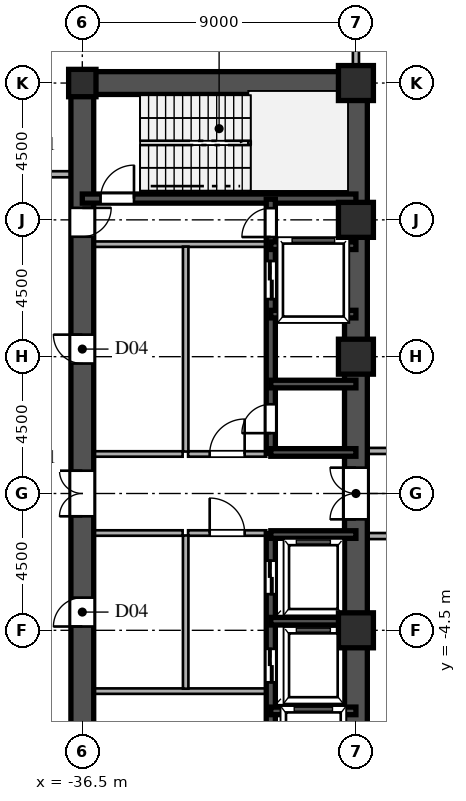
"""IFC4 building model, lengths in metres.
Left out: names, types, materials, properties, quantities, classifications, styles, units other than length and angle.
Written with IfcOpenShell. Run it as: python <this file> out.ifc"""

import sys

from ifc_helpers import new_model, si_unit, direction, frame, frame_2d, origin, origin_2d, place, context, subcontext, project, spatial, rectangle, hollow_rectangle, i_section, extrude, source, transform, mapped, element, fill, save


model = new_model("IFC4")
c1 = context("Model", 3, precision=1e-05, world=origin(), true_north=direction((0.0, 1.0)))
c2 = subcontext(c1, "Body", "Model", "MODEL_VIEW")
j1 = project(units=[si_unit("LENGTHUNIT", "METRE"), si_unit("PLANEANGLEUNIT", "RADIAN")], contexts=[c1])
p1 = place(None, origin())
s1 = spatial("IfcSite", under=j1, at=p1, CompositionType="ELEMENT")
p2 = place(p1, origin())
s2 = spatial("IfcBuilding", under=s1, at=p2, CompositionType="ELEMENT")
p3 = place(p2, frame((0.0, 0.0, -4.8)))
s3 = spatial("IfcBuildingStorey", under=s2, at=p3, CompositionType="ELEMENT", Elevation=-4.8)
m1 = source(origin(), c2, "Body", "SweptSolid", [
    extrude(hollow_rectangle(XDim=1.15, YDim=1.15, WallThickness=0.048, at=origin_2d()), origin(), (0.0, 0.0, 1.0), 4.8),
])
for number, where, z_axis, x_axis in (
    (1, (-27.5, -4.5, 0.0), (0.0, 0.0, 1.0), (1.0, 0.0, 0.0)),
    (2, (-27.5, 4.5, 0.0), (0.0, 0.0, 1.0), (1.0, 0.0, 0.0)),
    (3, (-27.5, 9.0, 0.0), (0.0, 0.0, 1.0), (1.0, 0.0, 0.0)),
    (4, (-27.5, 13.5, 0.0), (0.0, 0.0, 1.0), (1.0, 0.0, 0.0)),
):
    element("IfcColumn", number, at=place(p3, frame(where, z_axis=z_axis, x_axis=x_axis)), inside=s3, PredefinedType="COLUMN", context=c2, shape_type="MappedRepresentation", body=[
        mapped(m1, transform((0.0, 0.0, 0.0), scale=1.0)),
    ])
m2 = source(origin(), c2, "Body", "SweptSolid", [
    extrude(i_section(OverallWidth=0.9, OverallDepth=0.9, WebThickness=0.036, FlangeThickness=0.055, at=origin_2d()), origin(), (0.0, 0.0, 1.0), 4.8),
])
p4 = place(p3, frame((-36.5, 13.5, 0.0), z_axis=(0.0, 0.0, 1.0), x_axis=(1.0, 0.0, 0.0)))
e5 = element("IfcColumn", 5, at=p4, inside=s3, PredefinedType="COLUMN", context=c2, shape_type="MappedRepresentation", body=[
    mapped(m2, transform((0.0, 0.0, 0.0), scale=1.0)),
])
for number, where, z_axis, x_axis in (
    (6, (-27.5, -13.5, 0.0), (0.0, 0.0, 1.0), (0.0, 1.0, 0.0)),
    (7, (-27.5, 1.3, 0.0), (0.0, 0.0, 1.0), (0.0, 1.0, 0.0)),
):
    element("IfcWall", number, at=place(p3, frame(where, z_axis=z_axis, x_axis=x_axis)), inside=s3, PredefinedType="SHEAR", context=c2, shape_type="SweptSolid", body=[
        extrude(rectangle(XDim=12.2, YDim=0.75, at=frame_2d((6.1, 0.0))), origin(), (0.0, 0.0, 1.0), 4.52),
    ])
p5 = place(p3, frame((-27.5, -1.3, 0.0), z_axis=(0.0, 0.0, 1.0), x_axis=(0.0, 1.0, 0.0)))
e8 = element("IfcWall", 8, at=p5, inside=s3, PredefinedType="SHEAR", context=c2, shape_type="SweptSolid", body=[
    extrude(rectangle(XDim=2.6, YDim=0.75, at=frame_2d((1.3, 0.0))), origin(), (0.0, 0.0, 1.0), 4.52),
])
p6 = place(p5, frame((0.45, 0.0, 0.0)))
e9 = element("IfcOpeningElement", 9, at=p6, cuts=e8, PredefinedType="OPENING", context=c2, shape_type="SweptSolid", body=[
    extrude(rectangle(XDim=1.7, YDim=2.35, at=frame_2d((0.85, 1.175))), frame((0.0, 0.385, 0.0), z_axis=(0.0, -1.0, 0.0), x_axis=(1.0, 0.0, 0.0)), (0.0, 0.0, 1.0), 0.77),
])
p7 = place(p3, frame((-36.5, 13.5, 0.0), z_axis=(0.0, 0.0, 1.0), x_axis=(1.0, 0.0, 0.0)))
e10 = element("IfcWall", 10, at=p7, inside=s3, PredefinedType="SHEAR", context=c2, shape_type="SweptSolid", body=[
    extrude(rectangle(XDim=9.0, YDim=0.75, at=frame_2d((4.5, 0.0))), origin(), (0.0, 0.0, 1.0), 4.52),
])
p8 = place(p3, frame((-36.5, -13.65, 0.0), z_axis=(0.0, 0.0, 1.0), x_axis=(0.0, 1.0, 0.0)))
e11 = element("IfcWall", 11, at=p8, inside=s3, PredefinedType="SHEAR", context=c2, shape_type="SweptSolid", body=[
    extrude(rectangle(XDim=7.15, YDim=0.75, at=frame_2d((3.575, 0.0))), origin(), (0.0, 0.0, 1.0), 4.52),
])
p9 = place(p8, frame((4.675, 0.0, 0.0)))
e12 = element("IfcOpeningElement", 12, at=p9, cuts=e11, PredefinedType="OPENING", context=c2, shape_type="SweptSolid", body=[
    extrude(rectangle(XDim=1.15, YDim=2.2, at=frame_2d((0.575, 1.1))), frame((0.0, 0.385, 0.0), z_axis=(0.0, -1.0, 0.0), x_axis=(1.0, 0.0, 0.0)), (0.0, 0.0, 1.0), 0.77),
])
p10 = place(p3, frame((-36.5, -1.3, 0.0), z_axis=(0.0, 0.0, 1.0), x_axis=(0.0, 1.0, 0.0)))
e13 = element("IfcWall", 13, at=p10, inside=s3, PredefinedType="SHEAR", context=c2, shape_type="SweptSolid", body=[
    extrude(rectangle(XDim=2.6, YDim=0.75, at=frame_2d((1.3, 0.0))), origin(), (0.0, 0.0, 1.0), 4.52),
])
p11 = place(p10, frame((0.55, 0.0, 0.0)))
e14 = element("IfcOpeningElement", 14, at=p11, cuts=e13, PredefinedType="OPENING", context=c2, shape_type="SweptSolid", body=[
    extrude(rectangle(XDim=1.5, YDim=2.3, at=frame_2d((0.75, 1.15))), frame((0.0, 0.385, 0.0), z_axis=(0.0, -1.0, 0.0), x_axis=(1.0, 0.0, 0.0)), (0.0, 0.0, 1.0), 0.77),
])
p12 = place(p3, frame((-36.5, 8.2, 0.0), z_axis=(0.0, 0.0, 1.0), x_axis=(0.0, 1.0, 0.0)))
e15 = element("IfcWall", 15, at=p12, inside=s3, PredefinedType="SHEAR", context=c2, shape_type="SweptSolid", body=[
    extrude(rectangle(XDim=5.45, YDim=0.75, at=frame_2d((2.725, 0.0))), origin(), (0.0, 0.0, 1.0), 4.52),
])
p13 = place(p12, frame((0.245, 0.0, 0.0)))
e16 = element("IfcOpeningElement", 16, at=p13, cuts=e15, PredefinedType="OPENING", context=c2, shape_type="SweptSolid", body=[
    extrude(rectangle(XDim=0.95, YDim=2.15, at=frame_2d((0.475, 1.075))), frame((0.0, 0.385, 0.0), z_axis=(0.0, -1.0, 0.0), x_axis=(1.0, 0.0, 0.0)), (0.0, 0.0, 1.0), 0.77),
])
p14 = place(p3, frame((-36.5, -6.5, 0.0), z_axis=(0.0, 0.0, 1.0), x_axis=(0.0, 1.0, 0.0)))
e17 = element("IfcWall", 17, at=p14, inside=s3, PredefinedType="SHEAR", context=c2, shape_type="SweptSolid", body=[
    extrude(rectangle(XDim=5.2, YDim=0.75, at=frame_2d((2.6, 0.0))), origin(), (0.0, 0.0, 1.0), 4.52),
])
p15 = place(p14, frame((2.125, 0.0, 0.0)))
e18 = element("IfcOpeningElement", 18, at=p15, cuts=e17, PredefinedType="OPENING", context=c2, shape_type="SweptSolid", body=[
    extrude(rectangle(XDim=0.95, YDim=2.15, at=frame_2d((0.475, 1.075))), frame((0.0, 0.385, 0.0), z_axis=(0.0, -1.0, 0.0), x_axis=(1.0, 0.0, 0.0)), (0.0, 0.0, 1.0), 0.77),
])
p16 = place(p3, frame((-36.5, 1.3, 0.0), z_axis=(0.0, 0.0, 1.0), x_axis=(0.0, 1.0, 0.0)))
e19 = element("IfcWall", 19, at=p16, inside=s3, PredefinedType="SHEAR", context=c2, shape_type="SweptSolid", body=[
    extrude(rectangle(XDim=6.9, YDim=0.75, at=frame_2d((3.45, 0.0))), origin(), (0.0, 0.0, 1.0), 4.52),
])
p17 = place(p16, frame((2.975, 0.0, 0.0)))
e20 = element("IfcOpeningElement", 20, at=p17, cuts=e19, PredefinedType="OPENING", context=c2, shape_type="SweptSolid", body=[
    extrude(rectangle(XDim=0.95, YDim=2.15, at=frame_2d((0.475, 1.075))), frame((0.0, 0.385, 0.0), z_axis=(0.0, -1.0, 0.0), x_axis=(1.0, 0.0, 0.0)), (0.0, 0.0, 1.0), 0.77),
])
p18 = place(p3, frame((-36.5, 9.7, 0.0), z_axis=(0.0, 0.0, 1.0), x_axis=(1.0, 0.0, 0.0)))
e21 = element("IfcWall", 21, at=p18, inside=s3, PredefinedType="SHEAR", context=c2, shape_type="SweptSolid", body=[
    extrude(rectangle(XDim=9.0, YDim=0.3, at=frame_2d((4.5, 0.0))), origin(), (0.0, 0.0, 1.0), 4.52),
])
p19 = place(p18, frame((0.6, 0.0, 0.0)))
e22 = element("IfcOpeningElement", 22, at=p19, cuts=e21, PredefinedType="OPENING", context=c2, shape_type="SweptSolid", body=[
    extrude(rectangle(XDim=1.1, YDim=2.2, at=frame_2d((0.55, 1.1))), frame((0.0, 0.16, 0.0), z_axis=(0.0, -1.0, 0.0), x_axis=(1.0, 0.0, 0.0)), (0.0, 0.0, 1.0), 0.32),
])
for number, where, z_axis, x_axis in (
    (23, (-30.3, -7.15, 0.0), (0.0, 0.0, 1.0), (1.0, 0.0, 0.0)),
    (24, (-30.3, -4.2, 0.0), (0.0, 0.0, 1.0), (1.0, 0.0, 0.0)),
    (25, (-30.3, -1.35, 0.0), (0.0, 0.0, 1.0), (1.0, 0.0, 0.0)),
    (26, (-30.3, 1.35, 0.0), (0.0, 0.0, 1.0), (1.0, 0.0, 0.0)),
    (27, (-30.3, 3.6, 0.0), (0.0, 0.0, 1.0), (1.0, 0.0, 0.0)),
    (28, (-30.3, 5.9, 0.0), (0.0, 0.0, 1.0), (1.0, 0.0, 0.0)),
    (29, (-30.3, 8.15, 0.0), (0.0, 0.0, 1.0), (1.0, 0.0, 0.0)),
):
    element("IfcWall", number, at=place(p3, frame(where, z_axis=z_axis, x_axis=x_axis)), inside=s3, PredefinedType="SHEAR", context=c2, shape_type="SweptSolid", body=[
        extrude(rectangle(XDim=2.8, YDim=0.25, at=frame_2d((1.4, 0.0))), origin(), (0.0, 0.0, 1.0), 4.52),
    ])
p20 = place(p3, frame((-30.3, -9.68, 0.0), z_axis=(0.0, 0.0, 1.0), x_axis=(0.0, 1.0, 0.0)))
e30 = element("IfcWall", 30, at=p20, inside=s3, PredefinedType="SHEAR", context=c2, shape_type="SweptSolid", body=[
    extrude(rectangle(XDim=2.56, YDim=0.3, at=frame_2d((1.28, 0.0))), origin(), (0.0, 0.0, 1.0), 4.52),
])
p21 = place(p20, frame((0.68, 0.0, 0.0)))
e31 = element("IfcOpeningElement", 31, at=p21, cuts=e30, PredefinedType="OPENING", context=c2, shape_type="SweptSolid", body=[
    extrude(rectangle(XDim=1.2, YDim=2.25, at=frame_2d((0.6, 1.125))), frame((0.0, 0.16, 0.0), z_axis=(0.0, -1.0, 0.0), x_axis=(1.0, 0.0, 0.0)), (0.0, 0.0, 1.0), 0.32),
])
p22 = place(p3, frame((-30.3, -7.12, 0.0), z_axis=(0.0, 0.0, 1.0), x_axis=(0.0, 1.0, 0.0)))
e32 = element("IfcWall", 32, at=p22, inside=s3, PredefinedType="SHEAR", context=c2, shape_type="SweptSolid", body=[
    extrude(rectangle(XDim=2.92, YDim=0.3, at=frame_2d((1.46, 0.0))), origin(), (0.0, 0.0, 1.0), 4.52),
])
p23 = place(p22, frame((0.91, 0.0, 0.0)))
e33 = element("IfcOpeningElement", 33, at=p23, cuts=e32, PredefinedType="OPENING", context=c2, shape_type="SweptSolid", body=[
    extrude(rectangle(XDim=1.1, YDim=2.2, at=frame_2d((0.55, 1.1))), frame((0.0, 0.16, 0.0), z_axis=(0.0, -1.0, 0.0), x_axis=(1.0, 0.0, 0.0)), (0.0, 0.0, 1.0), 0.32),
])
p24 = place(p3, frame((-30.3, -4.2, 0.0), z_axis=(0.0, 0.0, 1.0), x_axis=(0.0, 1.0, 0.0)))
e34 = element("IfcWall", 34, at=p24, inside=s3, PredefinedType="SHEAR", context=c2, shape_type="SweptSolid", body=[
    extrude(rectangle(XDim=2.88, YDim=0.3, at=frame_2d((1.44, 0.0))), origin(), (0.0, 0.0, 1.0), 4.52),
])
p25 = place(p24, frame((0.89, 0.0, 0.0)))
e35 = element("IfcOpeningElement", 35, at=p25, cuts=e34, PredefinedType="OPENING", context=c2, shape_type="SweptSolid", body=[
    extrude(rectangle(XDim=1.1, YDim=2.2, at=frame_2d((0.55, 1.1))), frame((0.0, 0.16, 0.0), z_axis=(0.0, -1.0, 0.0), x_axis=(1.0, 0.0, 0.0)), (0.0, 0.0, 1.0), 0.32),
])
p26 = place(p3, frame((-30.3, 1.32, 0.0), z_axis=(0.0, 0.0, 1.0), x_axis=(0.0, 1.0, 0.0)))
e36 = element("IfcWall", 36, at=p26, inside=s3, PredefinedType="SHEAR", context=c2, shape_type="SweptSolid", body=[
    extrude(rectangle(XDim=2.28, YDim=0.3, at=frame_2d((1.14, 0.0))), origin(), (0.0, 0.0, 1.0), 4.52),
])
p27 = place(p26, frame((0.665, 0.0, 0.0)))
e37 = element("IfcOpeningElement", 37, at=p27, cuts=e36, PredefinedType="OPENING", context=c2, shape_type="SweptSolid", body=[
    extrude(rectangle(XDim=0.95, YDim=2.15, at=frame_2d((0.475, 1.075))), frame((0.0, 0.16, 0.0), z_axis=(0.0, -1.0, 0.0), x_axis=(1.0, 0.0, 0.0)), (0.0, 0.0, 1.0), 0.32),
])
p28 = place(p3, frame((-30.3, 3.6, 0.0), z_axis=(0.0, 0.0, 1.0), x_axis=(0.0, 1.0, 0.0)))
e38 = element("IfcWall", 38, at=p28, inside=s3, PredefinedType="SHEAR", context=c2, shape_type="SweptSolid", body=[
    extrude(rectangle(XDim=2.3, YDim=0.3, at=frame_2d((1.15, 0.0))), origin(), (0.0, 0.0, 1.0), 4.52),
])
p29 = place(p3, frame((-30.3, 5.9, 0.0), z_axis=(0.0, 0.0, 1.0), x_axis=(0.0, 1.0, 0.0)))
e39 = element("IfcWall", 39, at=p29, inside=s3, PredefinedType="SHEAR", context=c2, shape_type="SweptSolid", body=[
    extrude(rectangle(XDim=2.25, YDim=0.3, at=frame_2d((1.125, 0.0))), origin(), (0.0, 0.0, 1.0), 4.52),
])
p30 = place(p29, frame((0.495, 0.0, 0.0)))
e40 = element("IfcOpeningElement", 40, at=p30, cuts=e39, PredefinedType="OPENING", context=c2, shape_type="SweptSolid", body=[
    extrude(rectangle(XDim=1.25, YDim=2.3, at=frame_2d((0.625, 1.15))), frame((0.0, 0.16, 0.0), z_axis=(0.0, -1.0, 0.0), x_axis=(1.0, 0.0, 0.0)), (0.0, 0.0, 1.0), 0.32),
])
p31 = place(p3, frame((-30.3, 8.15, 0.0), z_axis=(0.0, 0.0, 1.0), x_axis=(0.0, 1.0, 0.0)))
e41 = element("IfcWall", 41, at=p31, inside=s3, PredefinedType="SHEAR", context=c2, shape_type="SweptSolid", body=[
    extrude(rectangle(XDim=1.53, YDim=0.3, at=frame_2d((0.765, 0.0))), origin(), (0.0, 0.0, 1.0), 4.52),
])
p32 = place(p31, frame((0.285, 0.0, 0.0)))
e42 = element("IfcOpeningElement", 42, at=p32, cuts=e41, PredefinedType="OPENING", context=c2, shape_type="SweptSolid", body=[
    extrude(rectangle(XDim=0.95, YDim=2.15, at=frame_2d((0.475, 1.075))), frame((0.0, 0.16, 0.0), z_axis=(0.0, -1.0, 0.0), x_axis=(1.0, 0.0, 0.0)), (0.0, 0.0, 1.0), 0.32),
])
for number, where, z_axis, x_axis in (
    (43, (-36.15, -6.5, 0.0), (0.0, 0.0, 1.0), (1.0, 0.0, 0.0)),
    (44, (-36.15, 8.2, 0.0), (0.0, 0.0, 1.0), (1.0, 0.0, 0.0)),
):
    element("IfcWall", number, at=place(p3, frame(where, z_axis=z_axis, x_axis=x_axis)), inside=s3, PredefinedType="PARTITIONING", context=c2, shape_type="SweptSolid", body=[
        extrude(rectangle(XDim=5.7, YDim=0.18, at=frame_2d((2.85, 0.0))), origin(), (0.0, 0.0, 1.0), 4.52),
    ])
p33 = place(p3, frame((-33.1, -6.42, 0.0), z_axis=(0.0, 0.0, 1.0), x_axis=(0.0, 1.0, 0.0)))
e45 = element("IfcWall", 45, at=p33, inside=s3, PredefinedType="PARTITIONING", context=c2, shape_type="SweptSolid", body=[
    extrude(rectangle(XDim=5.04, YDim=0.18, at=frame_2d((2.52, 0.0))), origin(), (0.0, 0.0, 1.0), 4.52),
])
p34 = place(p3, frame((-33.1, 1.38, 0.0), z_axis=(0.0, 0.0, 1.0), x_axis=(0.0, 1.0, 0.0)))
e46 = element("IfcWall", 46, at=p34, inside=s3, PredefinedType="PARTITIONING", context=c2, shape_type="SweptSolid", body=[
    extrude(rectangle(XDim=6.74, YDim=0.18, at=frame_2d((3.37, 0.0))), origin(), (0.0, 0.0, 1.0), 4.52),
])
p35 = place(p3, frame((-33.02, -1.3, 0.0), z_axis=(0.0, 0.0, 1.0), x_axis=(1.0, 0.0, 0.0)))
e47 = element("IfcWall", 47, at=p35, inside=s3, PredefinedType="PARTITIONING", context=c2, shape_type="SweptSolid", body=[
    extrude(rectangle(XDim=2.57, YDim=0.18, at=frame_2d((1.285, 0.0))), origin(), (0.0, 0.0, 1.0), 4.52),
])
p36 = place(p35, frame((0.71, 0.0, 0.0)))
e48 = element("IfcOpeningElement", 48, at=p36, cuts=e47, PredefinedType="OPENING", context=c2, shape_type="SweptSolid", body=[
    extrude(rectangle(XDim=1.15, YDim=2.2, at=frame_2d((0.575, 1.1))), frame((0.0, 0.1, 0.0), z_axis=(0.0, -1.0, 0.0), x_axis=(1.0, 0.0, 0.0)), (0.0, 0.0, 1.0), 0.2),
])
p37 = place(p3, frame((-33.02, 1.3, 0.0), z_axis=(0.0, 0.0, 1.0), x_axis=(1.0, 0.0, 0.0)))
e49 = element("IfcWall", 49, at=p37, inside=s3, PredefinedType="PARTITIONING", context=c2, shape_type="SweptSolid", body=[
    extrude(rectangle(XDim=2.57, YDim=0.18, at=frame_2d((1.285, 0.0))), origin(), (0.0, 0.0, 1.0), 4.52),
])
p38 = place(p37, frame((0.71, 0.0, 0.0)))
e50 = element("IfcOpeningElement", 50, at=p38, cuts=e49, PredefinedType="OPENING", context=c2, shape_type="SweptSolid", body=[
    extrude(rectangle(XDim=1.15, YDim=2.2, at=frame_2d((0.575, 1.1))), frame((0.0, 0.1, 0.0), z_axis=(0.0, -1.0, 0.0), x_axis=(1.0, 0.0, 0.0)), (0.0, 0.0, 1.0), 0.2),
])
for number, where, z_axis, x_axis in (
    (51, (-36.15, -1.3, 0.0), (0.0, 0.0, 1.0), (1.0, 0.0, 0.0)),
    (52, (-36.15, 1.3, 0.0), (0.0, 0.0, 1.0), (1.0, 0.0, 0.0)),
):
    element("IfcWall", number, at=place(p3, frame(where, z_axis=z_axis, x_axis=x_axis)), inside=s3, PredefinedType="PARTITIONING", context=c2, shape_type="SweptSolid", body=[
        extrude(rectangle(XDim=2.95, YDim=0.18, at=frame_2d((1.475, 0.0))), origin(), (0.0, 0.0, 1.0), 4.52),
    ])
p39 = place(p3, frame((-27.12, -1.4, 0.0), z_axis=(0.0, 0.0, 1.0), x_axis=(1.0, 0.0, 0.0)))
e53 = element("IfcWall", 53, at=p39, inside=s3, PredefinedType="PARTITIONING", context=c2, shape_type="SweptSolid", body=[
    extrude(rectangle(XDim=33.535, YDim=0.2, at=frame_2d((16.768, 0.0))), origin(), (0.0, 0.0, 1.0), 4.52),
])
p40 = place(p39, frame((16.045, 0.0, 0.0)))
e54 = element("IfcOpeningElement", 54, at=p40, cuts=e53, PredefinedType="OPENING", context=c2, shape_type="SweptSolid", body=[
    extrude(rectangle(XDim=1.15, YDim=2.2, at=frame_2d((0.575, 1.1))), frame((0.0, 0.11, 0.0), z_axis=(0.0, -1.0, 0.0), x_axis=(1.0, 0.0, 0.0)), (0.0, 0.0, 1.0), 0.22),
])
p41 = place(p3, frame((-27.12, 1.4, 0.0), z_axis=(0.0, 0.0, 1.0), x_axis=(1.0, 0.0, 0.0)))
e55 = element("IfcWall", 55, at=p41, inside=s3, PredefinedType="PARTITIONING", context=c2, shape_type="SweptSolid", body=[
    extrude(rectangle(XDim=54.24, YDim=0.2, at=frame_2d((27.12, 0.0))), origin(), (0.0, 0.0, 1.0), 4.52),
])
p42 = place(p41, frame((19.545, 0.0, 0.0)))
e56 = element("IfcOpeningElement", 56, at=p42, cuts=e55, PredefinedType="OPENING", context=c2, shape_type="SweptSolid", body=[
    extrude(rectangle(XDim=1.15, YDim=2.2, at=frame_2d((0.575, 1.1))), frame((0.0, 0.11, 0.0), z_axis=(0.0, -1.0, 0.0), x_axis=(1.0, 0.0, 0.0)), (0.0, 0.0, 1.0), 0.22),
])
p43 = place(p41, frame((46.93, 0.0, 0.0)))
e57 = element("IfcOpeningElement", 57, at=p43, cuts=e55, PredefinedType="OPENING", context=c2, shape_type="SweptSolid", body=[
    extrude(rectangle(XDim=0.88, YDim=2.1, at=frame_2d((0.44, 1.05))), frame((0.0, 0.11, 0.0), z_axis=(0.0, -1.0, 0.0), x_axis=(1.0, 0.0, 0.0)), (0.0, 0.0, 1.0), 0.22),
])
p44 = place(p3, frame((-38.915, 10.5, 0.0), z_axis=(0.0, 0.0, 1.0), x_axis=(1.0, 0.0, 0.0)))
e58 = element("IfcWall", 58, at=p44, inside=s3, PredefinedType="PARTITIONING", context=c2, shape_type="SweptSolid", body=[
    extrude(rectangle(XDim=2.035, YDim=0.2, at=frame_2d((1.018, 0.0))), origin(), (0.0, 0.0, 1.0), 4.52),
])
p45 = place(p3, frame((-27.5, 13.88, 0.0), z_axis=(0.0, 0.0, 1.0), x_axis=(0.0, 1.0, 0.0)))
e59 = element("IfcWall", 59, at=p45, inside=s3, PredefinedType="PARTITIONING", context=c2, shape_type="SweptSolid", body=[
    extrude(rectangle(XDim=7.933, YDim=0.2, at=frame_2d((3.966, 0.0))), origin(), (0.0, 0.0, 1.0), 3.932),
])
m3 = source(origin(), c2, "Body", "SweptSolid", [
    extrude(rectangle(XDim=1.7, YDim=2.35, at=frame_2d((0.85, 1.175))), frame((0.0, 0.025, 0.0), z_axis=(0.0, -1.0, 0.0), x_axis=(1.0, 0.0, 0.0)), (0.0, 0.0, 1.0), 0.05),
])
p46 = place(p6, origin())
e60 = element("IfcDoor", 60, at=p46, inside=s3, OperationType="DOUBLE_SWING_LEFT", PredefinedType="DOOR", context=c2, shape_type="MappedRepresentation", body=[
    mapped(m3, transform((0.0, 0.0, 0.0), scale=1.0)),
])
fill(e9, e60)
m4 = source(origin(), c2, "Body", "SweptSolid", [
    extrude(rectangle(XDim=1.5, YDim=2.3, at=frame_2d((0.75, 1.15))), frame((0.0, 0.025, 0.0), z_axis=(0.0, -1.0, 0.0), x_axis=(1.0, 0.0, 0.0)), (0.0, 0.0, 1.0), 0.05),
])
p47 = place(p11, origin())
e61 = element("IfcDoor", 61, at=p47, inside=s3, OperationType="DOUBLE_SWING_LEFT", PredefinedType="DOOR", context=c2, shape_type="MappedRepresentation", body=[
    mapped(m4, transform((0.0, 0.0, 0.0), scale=1.0)),
])
fill(e14, e61)
m5 = source(origin(), c2, "Body", "SweptSolid", [
    extrude(rectangle(XDim=0.95, YDim=2.15, at=frame_2d((0.475, 1.075))), frame((0.0, 0.025, 0.0), z_axis=(0.0, -1.0, 0.0), x_axis=(1.0, 0.0, 0.0)), (0.0, 0.0, 1.0), 0.05),
])
p48 = place(p13, frame((0.95, 0.0, 0.0), z_axis=(0.0, 0.0, 1.0), x_axis=(-1.0, 0.0, 0.0)))
e62 = element("IfcDoor", 62, at=p48, inside=s3, OperationType="SINGLE_SWING_RIGHT", PredefinedType="DOOR", context=c2, shape_type="MappedRepresentation", body=[
    mapped(m5, transform((0.0, 0.0, 0.0), scale=1.0)),
])
fill(e16, e62)
p49 = place(p15, origin())
e63 = element("IfcDoor", 63, at=p49, inside=s3, OperationType="SINGLE_SWING_LEFT", PredefinedType="DOOR", context=c2, shape_type="MappedRepresentation", body=[
    mapped(m5, transform((0.0, 0.0, 0.0), scale=1.0)),
])
fill(e18, e63)
p50 = place(p17, origin())
e64 = element("IfcDoor", 64, at=p50, inside=s3, OperationType="SINGLE_SWING_RIGHT", PredefinedType="DOOR", context=c2, shape_type="MappedRepresentation", body=[
    mapped(m5, transform((0.0, 0.0, 0.0), scale=1.0)),
])
fill(e20, e64)
m6 = source(origin(), c2, "Body", "SweptSolid", [
    extrude(rectangle(XDim=1.1, YDim=2.2, at=frame_2d((0.55, 1.1))), frame((0.0, 0.025, 0.0), z_axis=(0.0, -1.0, 0.0), x_axis=(1.0, 0.0, 0.0)), (0.0, 0.0, 1.0), 0.05),
])
p51 = place(p19, origin())
e65 = element("IfcDoor", 65, at=p51, inside=s3, OperationType="SINGLE_SWING_RIGHT", PredefinedType="DOOR", context=c2, shape_type="MappedRepresentation", body=[
    mapped(m6, transform((0.0, 0.0, 0.0), scale=1.0)),
])
fill(e22, e65)
m7 = source(origin(), c2, "Body", "SweptSolid", [
    extrude(rectangle(XDim=1.1, YDim=2.2, at=frame_2d((0.55, 1.1))), frame((0.0, 0.025, 0.0), z_axis=(0.0, -1.0, 0.0), x_axis=(1.0, 0.0, 0.0)), (0.0, 0.0, 1.0), 0.05),
])
p52 = place(p23, origin())
e66 = element("IfcDoor", 66, at=p52, inside=s3, OperationType="DOUBLE_DOOR_SLIDING", PredefinedType="DOOR", context=c2, shape_type="MappedRepresentation", body=[
    mapped(m7, transform((0.0, 0.0, 0.0), scale=1.0)),
])
fill(e33, e66)
p53 = place(p25, origin())
e67 = element("IfcDoor", 67, at=p53, inside=s3, OperationType="DOUBLE_DOOR_SLIDING", PredefinedType="DOOR", context=c2, shape_type="MappedRepresentation", body=[
    mapped(m7, transform((0.0, 0.0, 0.0), scale=1.0)),
])
fill(e35, e67)
p54 = place(p27, origin())
e68 = element("IfcDoor", 68, at=p54, inside=s3, OperationType="SINGLE_SWING_LEFT", PredefinedType="DOOR", context=c2, shape_type="MappedRepresentation", body=[
    mapped(m5, transform((0.0, 0.0, 0.0), scale=1.0)),
])
fill(e37, e68)
m8 = source(origin(), c2, "Body", "SweptSolid", [
    extrude(rectangle(XDim=1.25, YDim=2.3, at=frame_2d((0.625, 1.15))), frame((0.0, 0.025, 0.0), z_axis=(0.0, -1.0, 0.0), x_axis=(1.0, 0.0, 0.0)), (0.0, 0.0, 1.0), 0.05),
])
p55 = place(p30, origin())
e69 = element("IfcDoor", 69, at=p55, inside=s3, OperationType="DOUBLE_DOOR_SLIDING", PredefinedType="DOOR", context=c2, shape_type="MappedRepresentation", body=[
    mapped(m8, transform((0.0, 0.0, 0.0), scale=1.0)),
])
fill(e40, e69)
p56 = place(p32, origin())
e70 = element("IfcDoor", 70, at=p56, inside=s3, OperationType="SINGLE_SWING_LEFT", PredefinedType="DOOR", context=c2, shape_type="MappedRepresentation", body=[
    mapped(m5, transform((0.0, 0.0, 0.0), scale=1.0)),
])
fill(e42, e70)
m9 = source(origin(), c2, "Body", "SweptSolid", [
    extrude(rectangle(XDim=1.15, YDim=2.2, at=frame_2d((0.575, 1.1))), frame((0.0, 0.025, 0.0), z_axis=(0.0, -1.0, 0.0), x_axis=(1.0, 0.0, 0.0)), (0.0, 0.0, 1.0), 0.05),
])
p57 = place(p36, origin())
e71 = element("IfcDoor", 71, at=p57, inside=s3, OperationType="SINGLE_SWING_LEFT", PredefinedType="DOOR", context=c2, shape_type="MappedRepresentation", body=[
    mapped(m9, transform((0.0, 0.0, 0.0), scale=1.0)),
])
fill(e48, e71)
p58 = place(p38, origin())
e72 = element("IfcDoor", 72, at=p58, inside=s3, OperationType="SINGLE_SWING_RIGHT", PredefinedType="DOOR", context=c2, shape_type="MappedRepresentation", body=[
    mapped(m9, transform((0.0, 0.0, 0.0), scale=1.0)),
])
fill(e50, e72)
save(model, sys.argv[1])
